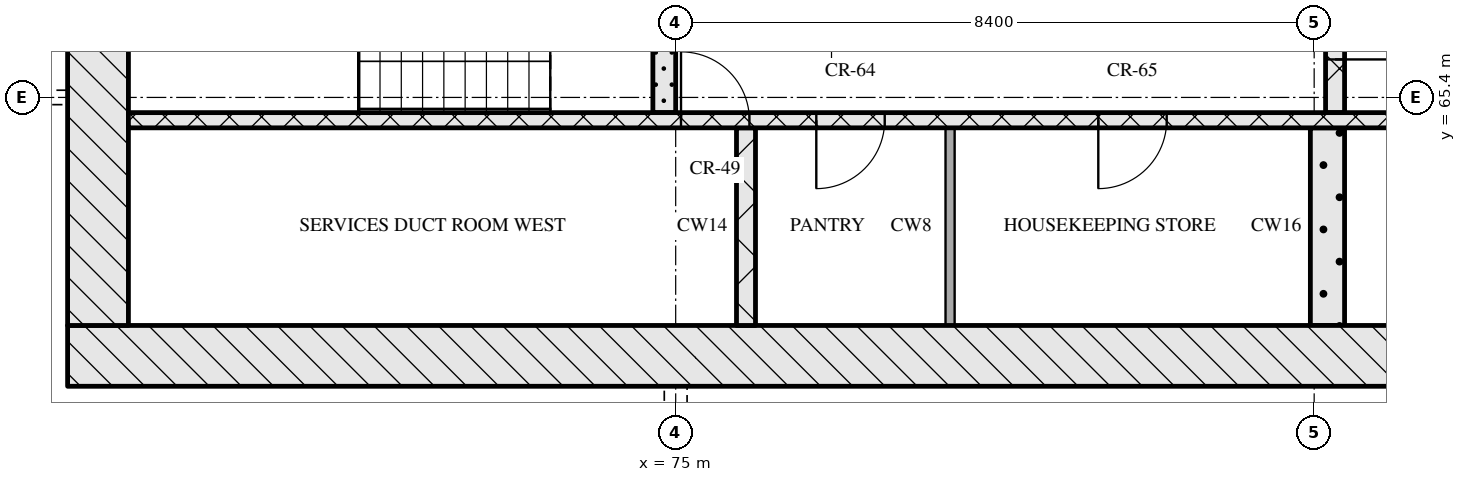
"""IFC4 building model, lengths in metres.
Left out: names, types, materials, properties, quantities, classifications, styles, units other than length and angle.
Written with IfcOpenShell. Run it as: python <this file> out.ifc"""

import sys

from ifc_helpers import new_model, si_unit, direction, frame, frame_2d, origin, place, context, subcontext, project, spatial, rectangle, extrude, element, fill, save


model = new_model("IFC4")
c1 = context("Model", 3, precision=1e-05, world=origin(), true_north=direction((0.0, 1.0)))
c2 = subcontext(c1, "Body", "Model", "MODEL_VIEW")
j1 = project(units=[si_unit("LENGTHUNIT", "METRE"), si_unit("PLANEANGLEUNIT", "RADIAN")], contexts=[c1])
p1 = place(None, origin())
s1 = spatial("IfcSite", under=j1, at=p1, CompositionType="ELEMENT")
p2 = place(p1, origin())
s2 = spatial("IfcBuilding", under=s1, at=p2, CompositionType="ELEMENT")
p3 = place(p2, frame((0.0, 0.0, 176.25)))
s3 = spatial("IfcBuildingStorey", under=s2, at=p3, CompositionType="ELEMENT", Elevation=176.25)
p4 = place(p3, frame((67.0, 62.0, 0.0), z_axis=(0.0, 0.0, 1.0), x_axis=(1.0, 0.0, 0.0)))
e1 = element("IfcWall", 1, at=p4, inside=s3, PredefinedType="SOLIDWALL", context=c2, shape_type="SweptSolid", body=[
    extrude(rectangle(XDim=41.2, YDim=0.8, at=frame_2d((20.6, 0.0))), origin(), (0.0, 0.0, 1.0), 3.32),
])
p5 = place(p4, frame((20.95, 0.0, 0.0)))
e2 = element("IfcOpeningElement", 2, at=p5, cuts=e1, PredefinedType="OPENING", context=c2, shape_type="SweptSolid", body=[
    extrude(rectangle(XDim=1.8, YDim=2.1, at=frame_2d((0.9, 1.05))), frame((0.0, 0.41, 0.0), z_axis=(0.0, -1.0, 0.0), x_axis=(1.0, 0.0, 0.0)), (0.0, 0.0, 1.0), 0.82),
])
p6 = place(p3, frame((67.4, 62.4, 0.0), z_axis=(0.0, 0.0, 1.0), x_axis=(0.0, 1.0, 0.0)))
e3 = element("IfcWall", 3, at=p6, inside=s3, PredefinedType="SOLIDWALL", context=c2, shape_type="SweptSolid", body=[
    extrude(rectangle(XDim=12.0, YDim=0.8, at=frame_2d((6.0, 0.0))), origin(), (0.0, 0.0, 1.0), 3.32),
])
p7 = place(p6, frame((6.45, 0.0, 0.0)))
e4 = element("IfcOpeningElement", 4, at=p7, cuts=e3, PredefinedType="OPENING", context=c2, shape_type="SweptSolid", body=[
    extrude(rectangle(XDim=1.2, YDim=2.1, at=frame_2d((0.6, 1.05))), frame((0.0, 0.41, 0.0), z_axis=(0.0, -1.0, 0.0), x_axis=(1.0, 0.0, 0.0)), (0.0, 0.0, 1.0), 0.82),
])
p8 = place(p3, frame((75.925, 62.4, 0.0), z_axis=(0.0, 0.0, 1.0), x_axis=(0.0, 1.0, 0.0)))
e5 = element("IfcWall", 5, at=p8, inside=s3, PredefinedType="SOLIDWALL", context=c2, shape_type="SweptSolid", body=[
    extrude(rectangle(XDim=2.6, YDim=0.25, at=frame_2d((1.3, 0.0))), origin(), (0.0, 0.0, 1.0), 3.32),
])
p9 = place(p3, frame((78.61, 62.4, 0.0), z_axis=(0.0, 0.0, 1.0), x_axis=(0.0, 1.0, 0.0)))
e6 = element("IfcWall", 6, at=p9, inside=s3, PredefinedType="PARTITIONING", context=c2, shape_type="SweptSolid", body=[
    extrude(rectangle(XDim=2.6, YDim=0.12, at=frame_2d((1.3, 0.0))), origin(), (0.0, 0.0, 1.0), 3.32),
])
p10 = place(p3, frame((83.575, 62.4, 0.0), z_axis=(0.0, 0.0, 1.0), x_axis=(0.0, 1.0, 0.0)))
e7 = element("IfcWall", 7, at=p10, inside=s3, PredefinedType="SOLIDWALL", context=c2, shape_type="SweptSolid", body=[
    extrude(rectangle(XDim=2.6, YDim=0.45, at=frame_2d((1.3, 0.0))), origin(), (0.0, 0.0, 1.0), 3.32),
])
p11 = place(p3, frame((67.8, 65.1, 0.0), z_axis=(0.0, 0.0, 1.0), x_axis=(1.0, 0.0, 0.0)))
e8 = element("IfcWall", 8, at=p11, inside=s3, PredefinedType="SOLIDWALL", context=c2, shape_type="SweptSolid", body=[
    extrude(rectangle(XDim=18.5, YDim=0.2, at=frame_2d((9.25, 0.0))), origin(), (0.0, 0.0, 1.0), 3.32),
])
p12 = place(p11, frame((7.27, 0.0, 0.0)))
e9 = element("IfcOpeningElement", 9, at=p12, cuts=e8, PredefinedType="OPENING", context=c2, shape_type="SweptSolid", body=[
    extrude(rectangle(XDim=0.9, YDim=2.1, at=frame_2d((0.45, 1.05))), frame((0.0, 0.11, 0.0), z_axis=(0.0, -1.0, 0.0), x_axis=(1.0, 0.0, 0.0)), (0.0, 0.0, 1.0), 0.22),
])
p13 = place(p11, frame((9.05, 0.0, 0.0)))
e10 = element("IfcOpeningElement", 10, at=p13, cuts=e8, PredefinedType="OPENING", context=c2, shape_type="SweptSolid", body=[
    extrude(rectangle(XDim=0.9, YDim=2.1, at=frame_2d((0.45, 1.05))), frame((0.0, 0.11, 0.0), z_axis=(0.0, -1.0, 0.0), x_axis=(1.0, 0.0, 0.0)), (0.0, 0.0, 1.0), 0.22),
])
p14 = place(p11, frame((12.76, 0.0, 0.0)))
e11 = element("IfcOpeningElement", 11, at=p14, cuts=e8, PredefinedType="OPENING", context=c2, shape_type="SweptSolid", body=[
    extrude(rectangle(XDim=0.9, YDim=2.1, at=frame_2d((0.45, 1.05))), frame((0.0, 0.11, 0.0), z_axis=(0.0, -1.0, 0.0), x_axis=(1.0, 0.0, 0.0)), (0.0, 0.0, 1.0), 0.22),
])
p15 = place(p11, frame((16.7, 0.0, 0.0)))
e12 = element("IfcOpeningElement", 12, at=p15, cuts=e8, PredefinedType="OPENING", context=c2, shape_type="SweptSolid", body=[
    extrude(rectangle(XDim=0.9, YDim=2.1, at=frame_2d((0.45, 1.05))), frame((0.0, 0.11, 0.0), z_axis=(0.0, -1.0, 0.0), x_axis=(1.0, 0.0, 0.0)), (0.0, 0.0, 1.0), 0.22),
])
p16 = place(p3, frame((74.85, 65.2, 0.0), z_axis=(0.0, 0.0, 1.0), x_axis=(0.0, 1.0, 0.0)))
e13 = element("IfcWall", 13, at=p16, inside=s3, PredefinedType="SOLIDWALL", context=c2, shape_type="SweptSolid", body=[
    extrude(rectangle(XDim=2.85, YDim=0.3, at=frame_2d((1.425, 0.0))), origin(), (0.0, 0.0, 1.0), 3.32),
])
p17 = place(p3, frame((83.675, 65.2, 0.0), z_axis=(0.0, 0.0, 1.0), x_axis=(0.0, 1.0, 0.0)))
e14 = element("IfcWall", 14, at=p17, inside=s3, PredefinedType="SOLIDWALL", context=c2, shape_type="SweptSolid", body=[
    extrude(rectangle(XDim=2.6, YDim=0.25, at=frame_2d((1.3, 0.0))), origin(), (0.0, 0.0, 1.0), 3.32),
])
p18 = place(p17, frame((0.7, 0.0, 0.0)))
e15 = element("IfcOpeningElement", 15, at=p18, cuts=e14, PredefinedType="OPENING", context=c2, shape_type="SweptSolid", body=[
    extrude(rectangle(XDim=1.2, YDim=2.1, at=frame_2d((0.6, 1.05))), frame((0.0, 0.135, 0.0), z_axis=(0.0, -1.0, 0.0), x_axis=(1.0, 0.0, 0.0)), (0.0, 0.0, 1.0), 0.27),
])
p19 = place(p12, origin())
e16 = element("IfcDoor", 16, at=p19, inside=s3, OperationType="SINGLE_SWING_LEFT", PredefinedType="DOOR", context=c2, shape_type="SweptSolid", body=[
    extrude(rectangle(XDim=0.9, YDim=2.1, at=frame_2d((0.45, 1.05))), frame((0.0, 0.025, 0.0), z_axis=(0.0, -1.0, 0.0), x_axis=(1.0, 0.0, 0.0)), (0.0, 0.0, 1.0), 0.05),
])
fill(e9, e16)
p20 = place(p13, origin())
e17 = element("IfcDoor", 17, at=p20, inside=s3, OperationType="SINGLE_SWING_RIGHT", PredefinedType="DOOR", context=c2, shape_type="SweptSolid", body=[
    extrude(rectangle(XDim=0.9, YDim=2.1, at=frame_2d((0.45, 1.05))), frame((0.0, 0.025, 0.0), z_axis=(0.0, -1.0, 0.0), x_axis=(1.0, 0.0, 0.0)), (0.0, 0.0, 1.0), 0.05),
])
fill(e10, e17)
p21 = place(p14, origin())
e18 = element("IfcDoor", 18, at=p21, inside=s3, OperationType="SINGLE_SWING_RIGHT", PredefinedType="DOOR", context=c2, shape_type="SweptSolid", body=[
    extrude(rectangle(XDim=0.9, YDim=2.1, at=frame_2d((0.45, 1.05))), frame((0.0, 0.025, 0.0), z_axis=(0.0, -1.0, 0.0), x_axis=(1.0, 0.0, 0.0)), (0.0, 0.0, 1.0), 0.05),
])
fill(e11, e18)
p22 = place(p18, origin())
e19 = element("IfcDoor", 19, at=p22, inside=s3, OperationType="SINGLE_SWING_RIGHT", PredefinedType="DOOR", context=c2, shape_type="SweptSolid", body=[
    extrude(rectangle(XDim=1.2, YDim=2.1, at=frame_2d((0.6, 1.05))), frame((0.0, 0.025, 0.0), z_axis=(0.0, -1.0, 0.0), x_axis=(1.0, 0.0, 0.0)), (0.0, 0.0, 1.0), 0.05),
])
fill(e15, e19)
save(model, sys.argv[1])
